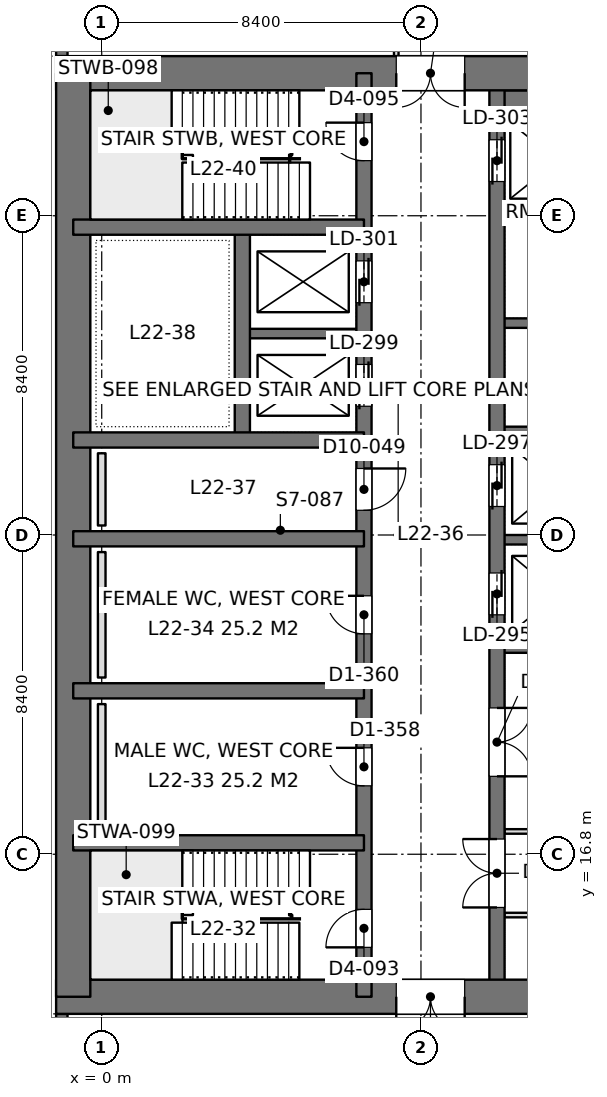
"""IFC4 building model, lengths in metres.
Left out: names, types, materials, properties, quantities, classifications, styles, units other than length and angle.
Written with IfcOpenShell. Run it as: python <this file> out.ifc"""

import sys

from ifc_helpers import new_model, si_unit, direction, frame, frame_2d, origin, place, context, subcontext, project, spatial, rectangle, extrude, element, fill, save


model = new_model("IFC4")
c1 = context("Model", 3, precision=1e-05, world=origin(), true_north=direction((0.0, 1.0)))
c2 = subcontext(c1, "Body", "Model", "MODEL_VIEW")
j1 = project(units=[si_unit("LENGTHUNIT", "METRE"), si_unit("PLANEANGLEUNIT", "RADIAN")], contexts=[c1])
p1 = place(None, origin())
s1 = spatial("IfcSite", under=j1, at=p1, CompositionType="ELEMENT")
p2 = place(p1, origin())
s2 = spatial("IfcBuilding", under=s1, at=p2, CompositionType="ELEMENT")
p3 = place(p2, frame((0.0, 0.0, 100.8)))
s3 = spatial("IfcBuildingStorey", under=s2, at=p3, CompositionType="ELEMENT", Elevation=100.8)
p4 = place(p3, frame((-1.2, 13.05, 0.0), z_axis=(0.0, 0.0, 1.0), x_axis=(1.0, 0.0, 0.0)))
e1 = element("IfcWall", 1, at=p4, inside=s3, PredefinedType="SHEAR", context=c2, shape_type="SweptSolid", body=[
    extrude(rectangle(XDim=18.0, YDim=0.9, at=frame_2d((9.0, 0.0))), origin(), (0.0, 0.0, 1.0), 4.2),
])
p5 = place(p4, frame((8.95, 0.0, 0.0)))
e2 = element("IfcOpeningElement", 2, at=p5, cuts=e1, PredefinedType="OPENING", context=c2, shape_type="SweptSolid", body=[
    extrude(rectangle(XDim=1.8, YDim=2.4, at=frame_2d((0.9, 1.2))), frame((0.0, 0.46, 0.0), z_axis=(0.0, -1.0, 0.0), x_axis=(1.0, 0.0, 0.0)), (0.0, 0.0, 1.0), 0.92),
])
p6 = place(p3, frame((-1.2, 37.35, 0.0), z_axis=(0.0, 0.0, 1.0), x_axis=(1.0, 0.0, 0.0)))
e3 = element("IfcWall", 3, at=p6, inside=s3, PredefinedType="SHEAR", context=c2, shape_type="SweptSolid", body=[
    extrude(rectangle(XDim=18.0, YDim=0.9, at=frame_2d((9.0, 0.0))), origin(), (0.0, 0.0, 1.0), 4.2),
])
p7 = place(p6, frame((8.95, 0.0, 0.0)))
e4 = element("IfcOpeningElement", 4, at=p7, cuts=e3, PredefinedType="OPENING", context=c2, shape_type="SweptSolid", body=[
    extrude(rectangle(XDim=1.8, YDim=2.4, at=frame_2d((0.9, 1.2))), frame((0.0, 0.46, 0.0), z_axis=(0.0, -1.0, 0.0), x_axis=(1.0, 0.0, 0.0)), (0.0, 0.0, 1.0), 0.92),
])
p8 = place(p3, frame((-0.75, 13.05, 0.0), z_axis=(0.0, 0.0, 1.0), x_axis=(0.0, 1.0, 0.0)))
e5 = element("IfcWall", 5, at=p8, inside=s3, PredefinedType="SHEAR", context=c2, shape_type="SweptSolid", body=[
    extrude(rectangle(XDim=24.3, YDim=0.9, at=frame_2d((12.15, 0.0))), origin(), (0.0, 0.0, 1.0), 4.2),
])
p9 = place(p3, frame((6.9, 13.05, 0.0), z_axis=(0.0, 0.0, 1.0), x_axis=(0.0, 1.0, 0.0)))
e6 = element("IfcWall", 6, at=p9, inside=s3, PredefinedType="SHEAR", context=c2, shape_type="SweptSolid", body=[
    extrude(rectangle(XDim=24.3, YDim=0.4, at=frame_2d((12.15, 0.0))), origin(), (0.0, 0.0, 1.0), 4.2),
])
p10 = place(p9, frame((1.3, 0.0, 0.0)))
e7 = element("IfcOpeningElement", 7, at=p10, cuts=e6, PredefinedType="OPENING", context=c2, shape_type="SweptSolid", body=[
    extrude(rectangle(XDim=1.0, YDim=2.2, at=frame_2d((0.5, 1.1))), frame((0.0, 0.21, 0.0), z_axis=(0.0, -1.0, 0.0), x_axis=(1.0, 0.0, 0.0)), (0.0, 0.0, 1.0), 0.42),
])
p11 = place(p9, frame((22.0, 0.0, 0.0)))
e8 = element("IfcOpeningElement", 8, at=p11, cuts=e6, PredefinedType="OPENING", context=c2, shape_type="SweptSolid", body=[
    extrude(rectangle(XDim=1.0, YDim=2.2, at=frame_2d((0.5, 1.1))), frame((0.0, 0.21, 0.0), z_axis=(0.0, -1.0, 0.0), x_axis=(1.0, 0.0, 0.0)), (0.0, 0.0, 1.0), 0.42),
])
p12 = place(p9, frame((5.55, 0.0, 0.0)))
e9 = element("IfcOpeningElement", 9, at=p12, cuts=e6, PredefinedType="OPENING", context=c2, shape_type="SweptSolid", body=[
    extrude(rectangle(XDim=1.0, YDim=2.2, at=frame_2d((0.5, 1.1))), frame((0.0, 0.21, 0.0), z_axis=(0.0, -1.0, 0.0), x_axis=(1.0, 0.0, 0.0)), (0.0, 0.0, 1.0), 0.42),
])
p13 = place(p9, frame((9.55, 0.0, 0.0)))
e10 = element("IfcOpeningElement", 10, at=p13, cuts=e6, PredefinedType="OPENING", context=c2, shape_type="SweptSolid", body=[
    extrude(rectangle(XDim=1.0, YDim=2.2, at=frame_2d((0.5, 1.1))), frame((0.0, 0.21, 0.0), z_axis=(0.0, -1.0, 0.0), x_axis=(1.0, 0.0, 0.0)), (0.0, 0.0, 1.0), 0.42),
])
p14 = place(p9, frame((12.8, 0.0, 0.0)))
e11 = element("IfcOpeningElement", 11, at=p14, cuts=e6, PredefinedType="OPENING", context=c2, shape_type="SweptSolid", body=[
    extrude(rectangle(XDim=1.1, YDim=2.2, at=frame_2d((0.55, 1.1))), frame((0.0, 0.21, 0.0), z_axis=(0.0, -1.0, 0.0), x_axis=(1.0, 0.0, 0.0)), (0.0, 0.0, 1.0), 0.42),
])
p15 = place(p9, frame((15.538, 0.0, 0.0)))
e12 = element("IfcOpeningElement", 12, at=p15, cuts=e6, PredefinedType="OPENING", context=c2, shape_type="SweptSolid", body=[
    extrude(rectangle(XDim=1.1, YDim=2.2, at=frame_2d((0.55, 1.1))), frame((0.0, 0.21, 0.0), z_axis=(0.0, -1.0, 0.0), x_axis=(1.0, 0.0, 0.0)), (0.0, 0.0, 1.0), 0.42),
])
p16 = place(p9, frame((18.262, 0.0, 0.0)))
e13 = element("IfcOpeningElement", 13, at=p16, cuts=e6, PredefinedType="OPENING", context=c2, shape_type="SweptSolid", body=[
    extrude(rectangle(XDim=1.1, YDim=2.2, at=frame_2d((0.55, 1.1))), frame((0.0, 0.21, 0.0), z_axis=(0.0, -1.0, 0.0), x_axis=(1.0, 0.0, 0.0)), (0.0, 0.0, 1.0), 0.42),
])
p17 = place(p3, frame((10.4, 13.05, 0.0), z_axis=(0.0, 0.0, 1.0), x_axis=(0.0, 1.0, 0.0)))
e14 = element("IfcWall", 14, at=p17, inside=s3, PredefinedType="SHEAR", context=c2, shape_type="SweptSolid", body=[
    extrude(rectangle(XDim=24.3, YDim=0.4, at=frame_2d((12.15, 0.0))), origin(), (0.0, 0.0, 1.0), 4.2),
])
p18 = place(p17, frame((10.05, 0.0, 0.0)))
e15 = element("IfcOpeningElement", 15, at=p18, cuts=e14, PredefinedType="OPENING", context=c2, shape_type="SweptSolid", body=[
    extrude(rectangle(XDim=1.1, YDim=2.2, at=frame_2d((0.55, 1.1))), frame((0.0, 0.21, 0.0), z_axis=(0.0, -1.0, 0.0), x_axis=(1.0, 0.0, 0.0)), (0.0, 0.0, 1.0), 0.42),
])
p19 = place(p17, frame((12.9, 0.0, 0.0)))
e16 = element("IfcOpeningElement", 16, at=p19, cuts=e14, PredefinedType="OPENING", context=c2, shape_type="SweptSolid", body=[
    extrude(rectangle(XDim=1.1, YDim=2.2, at=frame_2d((0.55, 1.1))), frame((0.0, 0.21, 0.0), z_axis=(0.0, -1.0, 0.0), x_axis=(1.0, 0.0, 0.0)), (0.0, 0.0, 1.0), 0.42),
])
p20 = place(p17, frame((21.45, 0.0, 0.0)))
e17 = element("IfcOpeningElement", 17, at=p20, cuts=e14, PredefinedType="OPENING", context=c2, shape_type="SweptSolid", body=[
    extrude(rectangle(XDim=1.1, YDim=2.2, at=frame_2d((0.55, 1.1))), frame((0.0, 0.21, 0.0), z_axis=(0.0, -1.0, 0.0), x_axis=(1.0, 0.0, 0.0)), (0.0, 0.0, 1.0), 0.42),
])
p21 = place(p17, frame((2.35, 0.0, 0.0)))
e18 = element("IfcOpeningElement", 18, at=p21, cuts=e14, PredefinedType="OPENING", context=c2, shape_type="SweptSolid", body=[
    extrude(rectangle(XDim=1.8, YDim=2.4, at=frame_2d((0.9, 1.2))), frame((0.0, 0.21, 0.0), z_axis=(0.0, -1.0, 0.0), x_axis=(1.0, 0.0, 0.0)), (0.0, 0.0, 1.0), 0.42),
])
p22 = place(p17, frame((5.8, 0.0, 0.0)))
e19 = element("IfcOpeningElement", 19, at=p22, cuts=e14, PredefinedType="OPENING", context=c2, shape_type="SweptSolid", body=[
    extrude(rectangle(XDim=1.8, YDim=2.4, at=frame_2d((0.9, 1.2))), frame((0.0, 0.21, 0.0), z_axis=(0.0, -1.0, 0.0), x_axis=(1.0, 0.0, 0.0)), (0.0, 0.0, 1.0), 0.42),
])
for number, where, z_axis, x_axis in (
    (20, (-0.75, 17.1, 0.0), (0.0, 0.0, 1.0), (1.0, 0.0, 0.0)),
    (21, (-0.75, 21.1, 0.0), (0.0, 0.0, 1.0), (1.0, 0.0, 0.0)),
    (22, (-0.75, 25.1, 0.0), (0.0, 0.0, 1.0), (1.0, 0.0, 0.0)),
    (23, (-0.75, 27.7, 0.0), (0.0, 0.0, 1.0), (1.0, 0.0, 0.0)),
    (24, (-0.75, 33.3, 0.0), (0.0, 0.0, 1.0), (1.0, 0.0, 0.0)),
):
    element("IfcWall", number, at=place(p3, frame(where, z_axis=z_axis, x_axis=x_axis)), inside=s3, PredefinedType="SHEAR", context=c2, shape_type="SweptSolid", body=[
        extrude(rectangle(XDim=7.65, YDim=0.4, at=frame_2d((3.825, 0.0))), origin(), (0.0, 0.0, 1.0), 4.2),
    ])
p23 = place(p3, frame((3.7, 27.7, 0.0), z_axis=(0.0, 0.0, 1.0), x_axis=(0.0, 1.0, 0.0)))
e25 = element("IfcWall", 25, at=p23, inside=s3, PredefinedType="SHEAR", context=c2, shape_type="SweptSolid", body=[
    extrude(rectangle(XDim=5.6, YDim=0.4, at=frame_2d((2.8, 0.0))), origin(), (0.0, 0.0, 1.0), 4.2),
])
p24 = place(p3, frame((3.7, 30.5, 0.0), z_axis=(0.0, 0.0, 1.0), x_axis=(1.0, 0.0, 0.0)))
e26 = element("IfcWall", 26, at=p24, inside=s3, PredefinedType="SHEAR", context=c2, shape_type="SweptSolid", body=[
    extrude(rectangle(XDim=3.2, YDim=0.25, at=frame_2d((1.6, 0.0))), origin(), (0.0, 0.0, 1.0), 4.2),
])
p25 = place(p3, frame((10.4, 22.225, 0.0), z_axis=(0.0, 0.0, 1.0), x_axis=(1.0, 0.0, 0.0)))
e27 = element("IfcWall", 27, at=p25, inside=s3, PredefinedType="SHEAR", context=c2, shape_type="SweptSolid", body=[
    extrude(rectangle(XDim=5.95, YDim=0.25, at=frame_2d((2.975, 0.0))), origin(), (0.0, 0.0, 1.0), 4.2),
])
for number, where, z_axis, x_axis in (
    (28, (10.4, 25.075, 0.0), (0.0, 0.0, 1.0), (1.0, 0.0, 0.0)),
    (29, (10.4, 27.925, 0.0), (0.0, 0.0, 1.0), (1.0, 0.0, 0.0)),
    (30, (10.4, 30.775, 0.0), (0.0, 0.0, 1.0), (1.0, 0.0, 0.0)),
    (31, (10.4, 33.625, 0.0), (0.0, 0.0, 1.0), (1.0, 0.0, 0.0)),
):
    element("IfcWall", number, at=place(p3, frame(where, z_axis=z_axis, x_axis=x_axis)), inside=s3, PredefinedType="SHEAR", context=c2, shape_type="SweptSolid", body=[
        extrude(rectangle(XDim=3.2, YDim=0.25, at=frame_2d((1.6, 0.0))), origin(), (0.0, 0.0, 1.0), 4.2),
    ])
p26 = place(p3, frame((10.4, 36.625, 0.0), z_axis=(0.0, 0.0, 1.0), x_axis=(1.0, 0.0, 0.0)))
e32 = element("IfcWall", 32, at=p26, inside=s3, PredefinedType="SHEAR", context=c2, shape_type="SweptSolid", body=[
    extrude(rectangle(XDim=3.2, YDim=0.55, at=frame_2d((1.6, 0.0))), origin(), (0.0, 0.0, 1.0), 4.2),
])
p27 = place(p3, frame((-1.05, 8.4, 0.0), z_axis=(0.0, 0.0, 1.0), x_axis=(0.0, 1.0, 0.0)))
e33 = element("IfcWall", 33, at=p27, inside=s3, PredefinedType="SOLIDWALL", context=c2, shape_type="SweptSolid", body=[
    extrude(rectangle(XDim=4.2, YDim=0.3, at=frame_2d((2.1, 0.0))), origin(), (0.0, 0.0, 1.0), 4.05),
])
p28 = place(p27, frame((0.9, 0.0, 0.9)))
e34 = element("IfcOpeningElement", 34, at=p28, cuts=e33, PredefinedType="OPENING", context=c2, shape_type="SweptSolid", body=[
    extrude(rectangle(XDim=2.4, YDim=1.9, at=frame_2d((1.2, 0.95))), frame((0.0, 0.16, 0.0), z_axis=(0.0, -1.0, 0.0), x_axis=(1.0, 0.0, 0.0)), (0.0, 0.0, 1.0), 0.32),
])
p29 = place(p3, frame((-1.05, 37.8, 0.0), z_axis=(0.0, 0.0, 1.0), x_axis=(0.0, 1.0, 0.0)))
e35 = element("IfcWall", 35, at=p29, inside=s3, PredefinedType="SOLIDWALL", context=c2, shape_type="SweptSolid", body=[
    extrude(rectangle(XDim=4.2, YDim=0.3, at=frame_2d((2.1, 0.0))), origin(), (0.0, 0.0, 1.0), 4.05),
])
p30 = place(p29, frame((0.9, 0.0, 0.9)))
e36 = element("IfcOpeningElement", 36, at=p30, cuts=e35, PredefinedType="OPENING", context=c2, shape_type="SweptSolid", body=[
    extrude(rectangle(XDim=2.4, YDim=1.9, at=frame_2d((1.2, 0.95))), frame((0.0, 0.16, 0.0), z_axis=(0.0, -1.0, 0.0), x_axis=(1.0, 0.0, 0.0)), (0.0, 0.0, 1.0), 0.32),
])
p31 = place(p3, frame((10.598, 17.4, 0.0), z_axis=(0.0, 0.0, 1.0), x_axis=(1.0, 0.0, 0.0)))
e37 = element("IfcWall", 37, at=p31, inside=s3, PredefinedType="PARTITIONING", context=c2, shape_type="SweptSolid", body=[
    extrude(rectangle(XDim=5.904, YDim=0.12, at=frame_2d((2.952, 0.0))), origin(), (0.0, 0.0, 1.0), 3.55),
])
p32 = place(p3, frame((10.598, 15.2, 0.0), z_axis=(0.0, 0.0, 1.0), x_axis=(1.0, 0.0, 0.0)))
e38 = element("IfcWall", 38, at=p32, inside=s3, PredefinedType="PARTITIONING", context=c2, shape_type="SweptSolid", body=[
    extrude(rectangle(XDim=6.204, YDim=0.12, at=frame_2d((3.102, 0.0))), origin(), (0.0, 0.0, 1.0), 3.55),
])
p33 = place(p3, frame((7.75, 37.8, 0.0), z_axis=(0.0, 0.0, 1.0), x_axis=(0.0, 1.0, 0.0)))
e39 = element("IfcWall", 39, at=p33, inside=s3, PredefinedType="PARTITIONING", context=c2, shape_type="SweptSolid", body=[
    extrude(rectangle(XDim=2.0, YDim=0.12, at=frame_2d((1.0, 0.0))), origin(), (0.0, 0.0, 1.0), 4.05),
])
for number, where, z_axis, x_axis in (
    (40, (0.0, 17.45, 0.0), (0.0, 0.0, 1.0), (0.0, 1.0, 0.0)),
    (41, (0.0, 21.45, 0.0), (0.0, 0.0, 1.0), (0.0, 1.0, 0.0)),
):
    element("IfcWall", number, at=place(p3, frame(where, z_axis=z_axis, x_axis=x_axis)), inside=s3, PredefinedType="PLUMBINGWALL", context=c2, shape_type="SweptSolid", body=[
        extrude(rectangle(XDim=3.3, YDim=0.2, at=frame_2d((1.65, 0.0))), origin(), (0.0, 0.0, 1.0), 1.2),
    ])
p34 = place(p3, frame((0.0, 25.45, 0.0), z_axis=(0.0, 0.0, 1.0), x_axis=(0.0, 1.0, 0.0)))
e42 = element("IfcWall", 42, at=p34, inside=s3, PredefinedType="PLUMBINGWALL", context=c2, shape_type="SweptSolid", body=[
    extrude(rectangle(XDim=1.9, YDim=0.2, at=frame_2d((0.95, 0.0))), origin(), (0.0, 0.0, 1.0), 1.2),
])
p35 = place(p5, frame((1.8, 0.0, 0.0), z_axis=(0.0, 0.0, 1.0), x_axis=(-1.0, 0.0, 0.0)))
e43 = element("IfcDoor", 43, at=p35, inside=s3, OperationType="DOUBLE_DOOR_SINGLE_SWING", PredefinedType="DOOR", context=c2, shape_type="SweptSolid", body=[
    extrude(rectangle(XDim=1.8, YDim=2.4, at=frame_2d((0.9, 1.2))), frame((0.0, 0.025, 0.0), z_axis=(0.0, -1.0, 0.0), x_axis=(1.0, 0.0, 0.0)), (0.0, 0.0, 1.0), 0.05),
])
fill(e2, e43)
p36 = place(p7, frame((1.8, 0.0, 0.0), z_axis=(0.0, 0.0, 1.0), x_axis=(-1.0, 0.0, 0.0)))
e44 = element("IfcDoor", 44, at=p36, inside=s3, OperationType="DOUBLE_DOOR_SINGLE_SWING", PredefinedType="DOOR", context=c2, shape_type="SweptSolid", body=[
    extrude(rectangle(XDim=1.8, YDim=2.4, at=frame_2d((0.9, 1.2))), frame((0.0, 0.025, 0.0), z_axis=(0.0, -1.0, 0.0), x_axis=(1.0, 0.0, 0.0)), (0.0, 0.0, 1.0), 0.05),
])
fill(e4, e44)
p37 = place(p10, origin())
e45 = element("IfcDoor", 45, at=p37, inside=s3, OperationType="SINGLE_SWING_LEFT", PredefinedType="DOOR", context=c2, shape_type="SweptSolid", body=[
    extrude(rectangle(XDim=1.0, YDim=2.2, at=frame_2d((0.5, 1.1))), frame((0.0, 0.025, 0.0), z_axis=(0.0, -1.0, 0.0), x_axis=(1.0, 0.0, 0.0)), (0.0, 0.0, 1.0), 0.05),
])
fill(e7, e45)
p38 = place(p11, origin())
e46 = element("IfcDoor", 46, at=p38, inside=s3, OperationType="SINGLE_SWING_RIGHT", PredefinedType="DOOR", context=c2, shape_type="SweptSolid", body=[
    extrude(rectangle(XDim=1.0, YDim=2.2, at=frame_2d((0.5, 1.1))), frame((0.0, 0.025, 0.0), z_axis=(0.0, -1.0, 0.0), x_axis=(1.0, 0.0, 0.0)), (0.0, 0.0, 1.0), 0.05),
])
fill(e8, e46)
p39 = place(p12, origin())
e47 = element("IfcDoor", 47, at=p39, inside=s3, OperationType="SINGLE_SWING_RIGHT", PredefinedType="DOOR", context=c2, shape_type="SweptSolid", body=[
    extrude(rectangle(XDim=1.0, YDim=2.2, at=frame_2d((0.5, 1.1))), frame((0.0, 0.025, 0.0), z_axis=(0.0, -1.0, 0.0), x_axis=(1.0, 0.0, 0.0)), (0.0, 0.0, 1.0), 0.05),
])
fill(e9, e47)
p40 = place(p13, origin())
e48 = element("IfcDoor", 48, at=p40, inside=s3, OperationType="SINGLE_SWING_RIGHT", PredefinedType="DOOR", context=c2, shape_type="SweptSolid", body=[
    extrude(rectangle(XDim=1.0, YDim=2.2, at=frame_2d((0.5, 1.1))), frame((0.0, 0.025, 0.0), z_axis=(0.0, -1.0, 0.0), x_axis=(1.0, 0.0, 0.0)), (0.0, 0.0, 1.0), 0.05),
])
fill(e10, e48)
p41 = place(p14, frame((1.1, 0.0, 0.0), z_axis=(0.0, 0.0, 1.0), x_axis=(-1.0, 0.0, 0.0)))
e49 = element("IfcDoor", 49, at=p41, inside=s3, OperationType="SINGLE_SWING_LEFT", PredefinedType="DOOR", context=c2, shape_type="SweptSolid", body=[
    extrude(rectangle(XDim=1.1, YDim=2.2, at=frame_2d((0.55, 1.1))), frame((0.0, 0.025, 0.0), z_axis=(0.0, -1.0, 0.0), x_axis=(1.0, 0.0, 0.0)), (0.0, 0.0, 1.0), 0.05),
])
fill(e11, e49)
p42 = place(p18, origin())
e50 = element("IfcDoor", 50, at=p42, inside=s3, OperationType="DOUBLE_DOOR_SLIDING", PredefinedType="DOOR", context=c2, shape_type="SweptSolid", body=[
    extrude(rectangle(XDim=1.1, YDim=2.2, at=frame_2d((0.55, 1.1))), frame((0.0, 0.025, 0.0), z_axis=(0.0, -1.0, 0.0), x_axis=(1.0, 0.0, 0.0)), (0.0, 0.0, 1.0), 0.05),
])
fill(e15, e50)
p43 = place(p19, origin())
e51 = element("IfcDoor", 51, at=p43, inside=s3, OperationType="DOUBLE_DOOR_SLIDING", PredefinedType="DOOR", context=c2, shape_type="SweptSolid", body=[
    extrude(rectangle(XDim=1.1, YDim=2.2, at=frame_2d((0.55, 1.1))), frame((0.0, 0.025, 0.0), z_axis=(0.0, -1.0, 0.0), x_axis=(1.0, 0.0, 0.0)), (0.0, 0.0, 1.0), 0.05),
])
fill(e16, e51)
p44 = place(p20, origin())
e52 = element("IfcDoor", 52, at=p44, inside=s3, OperationType="DOUBLE_DOOR_SLIDING", PredefinedType="DOOR", context=c2, shape_type="SweptSolid", body=[
    extrude(rectangle(XDim=1.1, YDim=2.2, at=frame_2d((0.55, 1.1))), frame((0.0, 0.025, 0.0), z_axis=(0.0, -1.0, 0.0), x_axis=(1.0, 0.0, 0.0)), (0.0, 0.0, 1.0), 0.05),
])
fill(e17, e52)
p45 = place(p15, origin())
e53 = element("IfcDoor", 53, at=p45, inside=s3, OperationType="DOUBLE_DOOR_SLIDING", PredefinedType="DOOR", context=c2, shape_type="SweptSolid", body=[
    extrude(rectangle(XDim=1.1, YDim=2.2, at=frame_2d((0.55, 1.1))), frame((0.0, 0.025, 0.0), z_axis=(0.0, -1.0, 0.0), x_axis=(1.0, 0.0, 0.0)), (0.0, 0.0, 1.0), 0.05),
])
fill(e12, e53)
p46 = place(p16, origin())
e54 = element("IfcDoor", 54, at=p46, inside=s3, OperationType="DOUBLE_DOOR_SLIDING", PredefinedType="DOOR", context=c2, shape_type="SweptSolid", body=[
    extrude(rectangle(XDim=1.1, YDim=2.2, at=frame_2d((0.55, 1.1))), frame((0.0, 0.025, 0.0), z_axis=(0.0, -1.0, 0.0), x_axis=(1.0, 0.0, 0.0)), (0.0, 0.0, 1.0), 0.05),
])
fill(e13, e54)
p47 = place(p21, origin())
e55 = element("IfcDoor", 55, at=p47, inside=s3, OperationType="DOUBLE_DOOR_SINGLE_SWING", PredefinedType="DOOR", context=c2, shape_type="SweptSolid", body=[
    extrude(rectangle(XDim=1.8, YDim=2.4, at=frame_2d((0.9, 1.2))), frame((0.0, 0.025, 0.0), z_axis=(0.0, -1.0, 0.0), x_axis=(1.0, 0.0, 0.0)), (0.0, 0.0, 1.0), 0.05),
])
fill(e18, e55)
p48 = place(p22, frame((1.8, 0.0, 0.0), z_axis=(0.0, 0.0, 1.0), x_axis=(-1.0, 0.0, 0.0)))
e56 = element("IfcDoor", 56, at=p48, inside=s3, OperationType="DOUBLE_DOOR_SINGLE_SWING", PredefinedType="DOOR", context=c2, shape_type="SweptSolid", body=[
    extrude(rectangle(XDim=1.8, YDim=2.4, at=frame_2d((0.9, 1.2))), frame((0.0, 0.025, 0.0), z_axis=(0.0, -1.0, 0.0), x_axis=(1.0, 0.0, 0.0)), (0.0, 0.0, 1.0), 0.05),
])
fill(e19, e56)
save(model, sys.argv[1])
